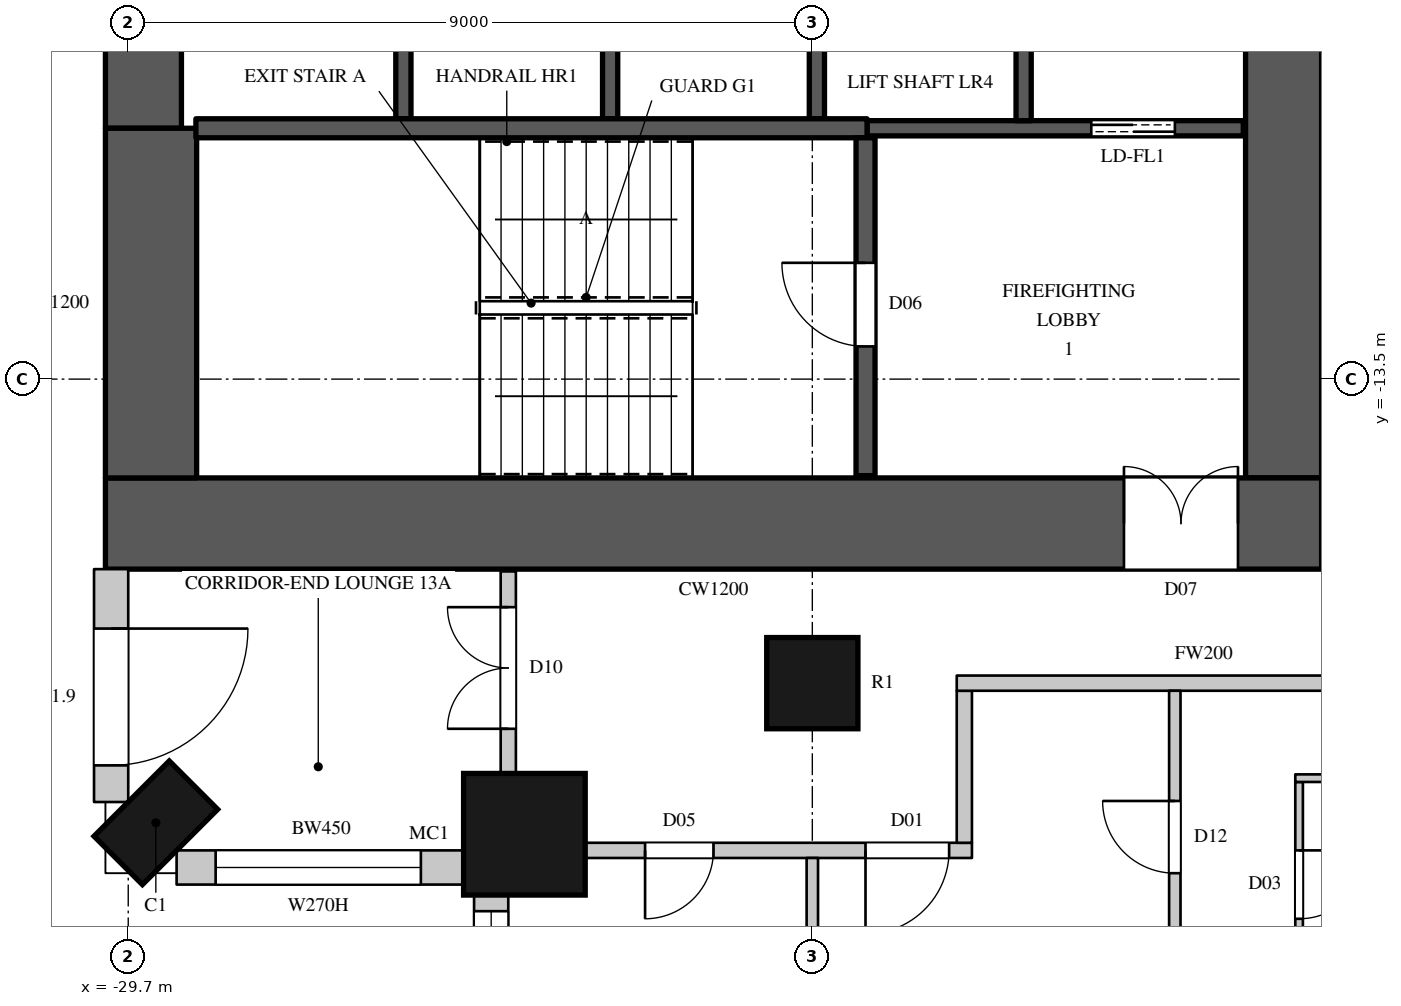
"""IFC4 building model, lengths in metres.
Left out: names, types, materials, properties, quantities, classifications, styles, units other than length and angle.
Written with IfcOpenShell. Run it as: python <this file> out.ifc"""

import sys

from ifc_helpers import new_model, si_unit, direction, frame, frame_2d, origin, origin_2d, place, context, subcontext, project, spatial, rectangle, circle, extrude, element, fill, save


model = new_model("IFC4")
c1 = context("Model", 3, precision=1e-05, world=origin(), true_north=direction((0.0, 1.0)))
c2 = subcontext(c1, "Body", "Model", "MODEL_VIEW")
j1 = project(units=[si_unit("LENGTHUNIT", "METRE"), si_unit("PLANEANGLEUNIT", "RADIAN")], contexts=[c1])
p1 = place(None, origin())
s1 = spatial("IfcSite", under=j1, at=p1, CompositionType="ELEMENT")
p2 = place(p1, origin())
s2 = spatial("IfcBuilding", under=s1, at=p2, CompositionType="ELEMENT")
p3 = place(p2, frame((0.0, 0.0, 77.1)))
s3 = spatial("IfcBuildingStorey", under=s2, at=p3, CompositionType="ELEMENT", Elevation=77.1)
p4 = place(p3, frame((-29.337, -19.337, 0.0), z_axis=(0.0, 0.0, 1.0), x_axis=(0.707106781187, -0.707106781187, 0.0)))
e1 = element("IfcColumn", 1, at=p4, inside=s3, PredefinedType="COLUMN", context=c2, shape_type="SweptSolid", body=[
    extrude(rectangle(XDim=0.9, YDim=1.4, at=origin_2d()), origin(), (0.0, 0.0, 1.0), 3.6),
])
p5 = place(p3, frame((-24.488, -19.488, 0.0), z_axis=(0.0, 0.0, 1.0), x_axis=(1.0, 0.0, 0.0)))
e2 = element("IfcColumn", 2, at=p5, inside=s3, PredefinedType="COLUMN", context=c2, shape_type="SweptSolid", body=[
    extrude(circle(Radius=0.8, at=origin_2d()), origin(), (0.0, 0.0, 1.0), 3.6),
])
p6 = place(p3, frame((-20.7, -17.5, 0.0), z_axis=(0.0, 0.0, 1.0), x_axis=(1.0, 0.0, 0.0)))
e3 = element("IfcColumn", 3, at=p6, inside=s3, PredefinedType="COLUMN", context=c2, shape_type="SweptSolid", body=[
    extrude(circle(Radius=0.6, at=origin_2d()), origin(), (0.0, 0.0, 1.0), 3.6),
])
p7 = place(p3, frame((-29.925, -16.0, 0.0), z_axis=(0.0, 0.0, 1.0), x_axis=(0.0, -1.0, 0.0)))
e4 = element("IfcWall", 4, at=p7, inside=s3, PredefinedType="SOLIDWALL", context=c2, shape_type="SweptSolid", body=[
    extrude(rectangle(XDim=3.064, YDim=0.45, at=frame_2d((1.532, 0.0))), origin(), (0.0, 0.0, 1.0), 3.3),
])
p8 = place(p7, frame((0.782, 0.0, 0.0)))
e5 = element("IfcOpeningElement", 5, at=p8, cuts=e4, PredefinedType="OPENING", context=c2, shape_type="SweptSolid", body=[
    extrude(rectangle(XDim=1.8, YDim=2.4, at=frame_2d((0.9, 1.2))), frame((0.0, 0.235, 0.0), z_axis=(0.0, -1.0, 0.0), x_axis=(1.0, 0.0, 0.0)), (0.0, 0.0, 1.0), 0.47),
])
p9 = place(p3, frame((-29.064, -19.925, 0.0), z_axis=(0.0, 0.0, 1.0), x_axis=(1.0, 0.0, 0.0)))
e6 = element("IfcWall", 6, at=p9, inside=s3, PredefinedType="SOLIDWALL", context=c2, shape_type="SweptSolid", body=[
    extrude(rectangle(XDim=3.805, YDim=0.45, at=frame_2d((1.903, 0.0))), origin(), (0.0, 0.0, 1.0), 3.3),
])
p10 = place(p9, frame((0.514, 0.0, 1.05)))
e7 = element("IfcOpeningElement", 7, at=p10, cuts=e6, PredefinedType="OPENING", context=c2, shape_type="SweptSolid", body=[
    extrude(rectangle(XDim=2.7, YDim=2.0, at=frame_2d((1.35, 1.0))), frame((0.0, 0.235, 0.0), z_axis=(0.0, -1.0, 0.0), x_axis=(1.0, 0.0, 0.0)), (0.0, 0.0, 1.0), 0.47),
])
p11 = place(p3, frame((-24.925, -20.259, 0.0), z_axis=(0.0, 0.0, 1.0), x_axis=(0.0, -1.0, 0.0)))
e8 = element("IfcWall", 8, at=p11, inside=s3, PredefinedType="SOLIDWALL", context=c2, shape_type="SweptSolid", body=[
    extrude(rectangle(XDim=1.792, YDim=0.45, at=frame_2d((0.896, 0.0))), origin(), (0.0, 0.0, 1.0), 3.3),
])
p12 = place(p11, frame((0.241, 0.0, 1.05)))
e9 = element("IfcOpeningElement", 9, at=p12, cuts=e8, PredefinedType="OPENING", context=c2, shape_type="SweptSolid", body=[
    extrude(rectangle(XDim=1.2, YDim=2.0, at=frame_2d((0.6, 1.0))), frame((0.0, 0.235, 0.0), z_axis=(0.0, -1.0, 0.0), x_axis=(1.0, 0.0, 0.0)), (0.0, 0.0, 1.0), 0.47),
])
p13 = place(p3, frame((-30.0, -15.4, 0.0), z_axis=(0.0, 0.0, 1.0), x_axis=(1.0, 0.0, 0.0)))
e10 = element("IfcWall", 10, at=p13, inside=s3, PredefinedType="SHEAR", context=c2, shape_type="SweptSolid", body=[
    extrude(rectangle(XDim=16.0, YDim=1.2, at=frame_2d((8.0, 0.0))), origin(), (0.0, 0.0, 1.0), 3.6),
])
p14 = place(p13, frame((13.4, 0.0, 0.0)))
e11 = element("IfcOpeningElement", 11, at=p14, cuts=e10, PredefinedType="OPENING", context=c2, shape_type="SweptSolid", body=[
    extrude(rectangle(XDim=1.5, YDim=2.4, at=frame_2d((0.75, 1.2))), frame((0.0, 0.61, 0.0), z_axis=(0.0, -1.0, 0.0), x_axis=(1.0, 0.0, 0.0)), (0.0, 0.0, 1.0), 1.22),
])
p15 = place(p3, frame((-14.5, -14.8, 0.0), z_axis=(0.0, 0.0, 1.0), x_axis=(0.0, 1.0, 0.0)))
e12 = element("IfcWall", 12, at=p15, inside=s3, PredefinedType="SHEAR", context=c2, shape_type="SweptSolid", body=[
    extrude(rectangle(XDim=29.6, YDim=1.0, at=frame_2d((14.8, 0.0))), origin(), (0.0, 0.0, 1.0), 3.6),
])
p16 = place(p15, frame((8.45, 0.0, 0.0)))
e13 = element("IfcOpeningElement", 13, at=p16, cuts=e12, PredefinedType="OPENING", context=c2, shape_type="SweptSolid", body=[
    extrude(rectangle(XDim=1.5, YDim=2.4, at=frame_2d((0.75, 1.2))), frame((0.0, 0.51, 0.0), z_axis=(0.0, -1.0, 0.0), x_axis=(1.0, 0.0, 0.0)), (0.0, 0.0, 1.0), 1.02),
])
p17 = place(p15, frame((19.65, 0.0, 0.0)))
e14 = element("IfcOpeningElement", 14, at=p17, cuts=e12, PredefinedType="OPENING", context=c2, shape_type="SweptSolid", body=[
    extrude(rectangle(XDim=1.5, YDim=2.4, at=frame_2d((0.75, 1.2))), frame((0.0, 0.51, 0.0), z_axis=(0.0, -1.0, 0.0), x_axis=(1.0, 0.0, 0.0)), (0.0, 0.0, 1.0), 1.02),
])
p18 = place(p15, frame((14.5, 0.0, 0.0)))
e15 = element("IfcOpeningElement", 15, at=p18, cuts=e12, PredefinedType="OPENING", context=c2, shape_type="SweptSolid", body=[
    extrude(rectangle(XDim=0.6, YDim=2.0, at=frame_2d((0.3, 1.0))), frame((0.0, 0.51, 0.0), z_axis=(0.0, -1.0, 0.0), x_axis=(1.0, 0.0, 0.0)), (0.0, 0.0, 1.0), 1.02),
])
p19 = place(p3, frame((-29.5, -10.2, 0.0), z_axis=(0.0, 0.0, 1.0), x_axis=(0.0, 1.0, 0.0)))
e16 = element("IfcWall", 16, at=p19, inside=s3, PredefinedType="SHEAR", context=c2, shape_type="SweptSolid", body=[
    extrude(rectangle(XDim=20.4, YDim=1.0, at=frame_2d((10.2, 0.0))), origin(), (0.0, 0.0, 1.0), 3.6),
])
p20 = place(p3, frame((-29.4, -14.8, 0.0), z_axis=(0.0, 0.0, 1.0), x_axis=(0.0, 1.0, 0.0)))
e17 = element("IfcWall", 17, at=p20, inside=s3, PredefinedType="SHEAR", context=c2, shape_type="SweptSolid", body=[
    extrude(rectangle(XDim=4.6, YDim=1.2, at=frame_2d((2.3, 0.0))), origin(), (0.0, 0.0, 1.0), 3.6),
])
p21 = place(p3, frame((-24.7, -18.7, 0.0), z_axis=(0.0, 0.0, 1.0), x_axis=(0.0, 1.0, 0.0)))
e18 = element("IfcWall", 18, at=p21, inside=s3, PredefinedType="PARTITIONING", context=c2, shape_type="SweptSolid", body=[
    extrude(rectangle(XDim=2.67, YDim=0.2, at=frame_2d((1.335, 0.0))), origin(), (0.0, 0.0, 1.0), 3.3),
])
p22 = place(p21, frame((0.6, 0.0, 0.0)))
e19 = element("IfcOpeningElement", 19, at=p22, cuts=e18, PredefinedType="OPENING", context=c2, shape_type="SweptSolid", body=[
    extrude(rectangle(XDim=1.6, YDim=2.4, at=frame_2d((0.8, 1.2))), frame((0.0, 0.11, 0.0), z_axis=(0.0, -1.0, 0.0), x_axis=(1.0, 0.0, 0.0)), (0.0, 0.0, 1.0), 0.22),
])
p23 = place(p3, frame((-23.7, -19.7, 0.0), z_axis=(0.0, 0.0, 1.0), x_axis=(1.0, 0.0, 0.0)))
e20 = element("IfcWall", 20, at=p23, inside=s3, PredefinedType="PARTITIONING", context=c2, shape_type="SweptSolid", body=[
    extrude(rectangle(XDim=5.1, YDim=0.2, at=frame_2d((2.55, 0.0))), origin(), (0.0, 0.0, 1.0), 3.3),
])
p24 = place(p23, frame((0.8, 0.0, 0.0)))
e21 = element("IfcOpeningElement", 21, at=p24, cuts=e20, PredefinedType="OPENING", context=c2, shape_type="SweptSolid", body=[
    extrude(rectangle(XDim=0.9, YDim=2.2, at=frame_2d((0.45, 1.1))), frame((0.0, 0.11, 0.0), z_axis=(0.0, -1.0, 0.0), x_axis=(1.0, 0.0, 0.0)), (0.0, 0.0, 1.0), 0.22),
])
p25 = place(p23, frame((3.7, 0.0, 0.0)))
e22 = element("IfcOpeningElement", 22, at=p25, cuts=e20, PredefinedType="OPENING", context=c2, shape_type="SweptSolid", body=[
    extrude(rectangle(XDim=1.1, YDim=2.4, at=frame_2d((0.55, 1.2))), frame((0.0, 0.11, 0.0), z_axis=(0.0, -1.0, 0.0), x_axis=(1.0, 0.0, 0.0)), (0.0, 0.0, 1.0), 0.22),
])
p26 = place(p3, frame((-18.7, -19.6, 0.0), z_axis=(0.0, 0.0, 1.0), x_axis=(0.0, 1.0, 0.0)))
e23 = element("IfcWall", 23, at=p26, inside=s3, PredefinedType="PARTITIONING", context=c2, shape_type="SweptSolid", body=[
    extrude(rectangle(XDim=2.0, YDim=0.2, at=frame_2d((1.0, 0.0))), origin(), (0.0, 0.0, 1.0), 3.3),
])
p27 = place(p3, frame((-18.8, -17.5, 0.0), z_axis=(0.0, 0.0, 1.0), x_axis=(1.0, 0.0, 0.0)))
e24 = element("IfcWall", 24, at=p27, inside=s3, PredefinedType="PARTITIONING", context=c2, shape_type="SweptSolid", body=[
    extrude(rectangle(XDim=6.5, YDim=0.2, at=frame_2d((3.25, 0.0))), origin(), (0.0, 0.0, 1.0), 2.75),
])
p28 = place(p3, frame((-20.7, -24.75, 0.0), z_axis=(0.0, 0.0, 1.0), x_axis=(0.0, 1.0, 0.0)))
e25 = element("IfcWall", 25, at=p28, inside=s3, PredefinedType="PARTITIONING", context=c2, shape_type="SweptSolid", body=[
    extrude(rectangle(XDim=4.95, YDim=0.15, at=frame_2d((2.475, 0.0))), origin(), (0.0, 0.0, 1.0), 2.75),
])
p29 = place(p3, frame((-15.931, -25.7, 0.0), z_axis=(0.0, 0.0, 1.0), x_axis=(0.0, 1.0, 0.0)))
e26 = element("IfcWall", 26, at=p29, inside=s3, PredefinedType="PARTITIONING", context=c2, shape_type="SweptSolid", body=[
    extrude(rectangle(XDim=8.1, YDim=0.15, at=frame_2d((4.05, 0.0))), origin(), (0.0, 0.0, 1.0), 3.3),
])
p30 = place(p29, frame((5.7, 0.0, 0.0)))
e27 = element("IfcOpeningElement", 27, at=p30, cuts=e26, PredefinedType="OPENING", context=c2, shape_type="SweptSolid", body=[
    extrude(rectangle(XDim=0.95, YDim=2.2, at=frame_2d((0.475, 1.1))), frame((0.0, 0.085, 0.0), z_axis=(0.0, -1.0, 0.0), x_axis=(1.0, 0.0, 0.0)), (0.0, 0.0, 1.0), 0.17),
])
for number, where, z_axis, x_axis in (
    (28, (-26.08, -10.075, 0.0), (0.0, 0.0, 1.0), (0.0, 1.0, 0.0)),
    (29, (-23.36, -10.075, 0.0), (0.0, 0.0, 1.0), (0.0, 1.0, 0.0)),
    (30, (-20.64, -10.075, 0.0), (0.0, 0.0, 1.0), (0.0, 1.0, 0.0)),
):
    element("IfcWall", number, at=place(p3, frame(where, z_axis=z_axis, x_axis=x_axis)), inside=s3, PredefinedType="SHEAR", context=c2, shape_type="SweptSolid", body=[
        extrude(rectangle(XDim=2.575, YDim=0.2, at=frame_2d((1.288, 0.0))), origin(), (0.0, 0.0, 1.0), 3.6),
    ])
p31 = place(p3, frame((-19.98, -10.2, 0.0), z_axis=(0.0, 0.0, 1.0), x_axis=(1.0, 0.0, 0.0)))
e31 = element("IfcWall", 31, at=p31, inside=s3, PredefinedType="SHEAR", context=c2, shape_type="SweptSolid", body=[
    extrude(rectangle(XDim=4.95, YDim=0.2, at=frame_2d((2.475, 0.0))), origin(), (0.0, 0.0, 1.0), 3.3),
])
p32 = place(p31, frame((2.95, 0.0, 0.0)))
e32 = element("IfcOpeningElement", 32, at=p32, cuts=e31, PredefinedType="OPENING", context=c2, shape_type="SweptSolid", body=[
    extrude(rectangle(XDim=1.1, YDim=2.2, at=frame_2d((0.55, 1.1))), frame((0.0, 0.11, 0.0), z_axis=(0.0, -1.0, 0.0), x_axis=(1.0, 0.0, 0.0)), (0.0, 0.0, 1.0), 0.22),
])
p33 = place(p3, frame((-17.92, -10.1, 0.0), z_axis=(0.0, 0.0, 1.0), x_axis=(0.0, 1.0, 0.0)))
e33 = element("IfcWall", 33, at=p33, inside=s3, PredefinedType="SHEAR", context=c2, shape_type="SweptSolid", body=[
    extrude(rectangle(XDim=2.6, YDim=0.2, at=frame_2d((1.3, 0.0))), origin(), (0.0, 0.0, 1.0), 3.6),
])
p34 = place(p3, frame((-28.81, -10.2, 0.0), z_axis=(0.0, 0.0, 1.0), x_axis=(1.0, 0.0, 0.0)))
e34 = element("IfcWall", 34, at=p34, inside=s3, PredefinedType="SHEAR", context=c2, shape_type="SweptSolid", body=[
    extrude(rectangle(XDim=8.83, YDim=0.25, at=frame_2d((4.415, 0.0))), origin(), (0.0, 0.0, 1.0), 3.3),
])
p35 = place(p3, frame((-20.0, -14.77, 0.0), z_axis=(0.0, 0.0, 1.0), x_axis=(0.0, 1.0, 0.0)))
e35 = element("IfcWall", 35, at=p35, inside=s3, PredefinedType="SHEAR", context=c2, shape_type="SweptSolid", body=[
    extrude(rectangle(XDim=4.445, YDim=0.25, at=frame_2d((2.223, 0.0))), origin(), (0.0, 0.0, 1.0), 3.3),
])
p36 = place(p35, frame((1.7, 0.0, 0.0)))
e36 = element("IfcOpeningElement", 36, at=p36, cuts=e35, PredefinedType="OPENING", context=c2, shape_type="SweptSolid", body=[
    extrude(rectangle(XDim=1.1, YDim=2.2, at=frame_2d((0.55, 1.1))), frame((0.0, 0.135, 0.0), z_axis=(0.0, -1.0, 0.0), x_axis=(1.0, 0.0, 0.0)), (0.0, 0.0, 1.0), 0.27),
])
p37 = place(p3, frame((-14.296, -21.5, 0.0), z_axis=(0.0, 0.0, 1.0), x_axis=(0.0, 1.0, 0.0)))
e37 = element("IfcWall", 37, at=p37, inside=s3, PredefinedType="PARTITIONING", context=c2, shape_type="SweptSolid", body=[
    extrude(rectangle(XDim=2.7, YDim=0.1, at=frame_2d((1.35, 0.0))), origin(), (0.0, 0.0, 1.0), 3.3),
])
p38 = place(p37, frame((0.9, 0.0, 0.0)))
e38 = element("IfcOpeningElement", 38, at=p38, cuts=e37, PredefinedType="OPENING", context=c2, shape_type="SweptSolid", body=[
    extrude(rectangle(XDim=0.9, YDim=2.2, at=frame_2d((0.45, 1.1))), frame((0.0, 0.06, 0.0), z_axis=(0.0, -1.0, 0.0), x_axis=(1.0, 0.0, 0.0)), (0.0, 0.0, 1.0), 0.12),
])
p39 = place(p3, frame((-14.346, -18.75, 0.0), z_axis=(0.0, 0.0, 1.0), x_axis=(1.0, 0.0, 0.0)))
e39 = element("IfcWall", 39, at=p39, inside=s3, PredefinedType="PARTITIONING", context=c2, shape_type="SweptSolid", body=[
    extrude(rectangle(XDim=5.092, YDim=0.1, at=frame_2d((2.546, 0.0))), origin(), (0.0, 0.0, 1.0), 3.3),
])
p40 = place(p39, frame((3.95, 0.0, 0.0)))
e40 = element("IfcOpeningElement", 40, at=p40, cuts=e39, PredefinedType="OPENING", context=c2, shape_type="SweptSolid", body=[
    extrude(rectangle(XDim=0.9, YDim=2.2, at=frame_2d((0.45, 1.1))), frame((0.0, 0.06, 0.0), z_axis=(0.0, -1.0, 0.0), x_axis=(1.0, 0.0, 0.0)), (0.0, 0.0, 1.0), 0.12),
])
p41 = place(p8, origin())
e41 = element("IfcDoor", 41, at=p41, inside=s3, OperationType="SLIDING_TO_LEFT", PredefinedType="DOOR", context=c2, shape_type="SweptSolid", body=[
    extrude(rectangle(XDim=1.8, YDim=2.4, at=frame_2d((0.9, 1.2))), frame((0.0, 0.13, 0.0), z_axis=(0.0, -1.0, 0.0), x_axis=(1.0, 0.0, 0.0)), (0.0, 0.0, 1.0), 0.05),
])
fill(e5, e41)
p42 = place(p10, origin())
e42 = element("IfcWindow", 42, at=p42, inside=s3, PartitioningType="SINGLE_PANEL", PredefinedType="WINDOW", context=c2, shape_type="SweptSolid", body=[
    extrude(rectangle(XDim=2.7, YDim=2.0, at=frame_2d((1.35, 1.0))), frame((0.0, 0.135, 0.0), z_axis=(0.0, -1.0, 0.0), x_axis=(1.0, 0.0, 0.0)), (0.0, 0.0, 1.0), 0.06),
])
fill(e7, e42)
p43 = place(p12, origin())
e43 = element("IfcWindow", 43, at=p43, inside=s3, PartitioningType="SINGLE_PANEL", PredefinedType="WINDOW", context=c2, shape_type="SweptSolid", body=[
    extrude(rectangle(XDim=1.2, YDim=2.0, at=frame_2d((0.6, 1.0))), frame((0.0, 0.135, 0.0), z_axis=(0.0, -1.0, 0.0), x_axis=(1.0, 0.0, 0.0)), (0.0, 0.0, 1.0), 0.06),
])
fill(e9, e43)
p44 = place(p36, origin())
e44 = element("IfcDoor", 44, at=p44, inside=s3, OperationType="SINGLE_SWING_RIGHT", PredefinedType="DOOR", context=c2, shape_type="SweptSolid", body=[
    extrude(rectangle(XDim=1.1, YDim=2.2, at=frame_2d((0.55, 1.1))), frame((0.0, 0.025, 0.0), z_axis=(0.0, -1.0, 0.0), x_axis=(1.0, 0.0, 0.0)), (0.0, 0.0, 1.0), 0.05),
])
fill(e36, e44)
p45 = place(p32, origin())
e45 = element("IfcDoor", 45, at=p45, inside=s3, OperationType="DOUBLE_DOOR_SLIDING", PredefinedType="DOOR", context=c2, shape_type="SweptSolid", body=[
    extrude(rectangle(XDim=1.1, YDim=2.2, at=frame_2d((0.55, 1.1))), frame((0.0, 0.025, 0.0), z_axis=(0.0, -1.0, 0.0), x_axis=(1.0, 0.0, 0.0)), (0.0, 0.0, 1.0), 0.05),
])
fill(e32, e45)
p46 = place(p24, origin())
e46 = element("IfcDoor", 46, at=p46, inside=s3, OperationType="SINGLE_SWING_RIGHT", PredefinedType="DOOR", context=c2, shape_type="SweptSolid", body=[
    extrude(rectangle(XDim=0.9, YDim=2.2, at=frame_2d((0.45, 1.1))), frame((0.0, 0.025, 0.0), z_axis=(0.0, -1.0, 0.0), x_axis=(1.0, 0.0, 0.0)), (0.0, 0.0, 1.0), 0.05),
])
fill(e21, e46)
p47 = place(p22, origin())
e47 = element("IfcDoor", 47, at=p47, inside=s3, OperationType="DOUBLE_DOOR_SINGLE_SWING", PredefinedType="DOOR", context=c2, shape_type="SweptSolid", body=[
    extrude(rectangle(XDim=1.6, YDim=2.4, at=frame_2d((0.8, 1.2))), frame((0.0, 0.025, 0.0), z_axis=(0.0, -1.0, 0.0), x_axis=(1.0, 0.0, 0.0)), (0.0, 0.0, 1.0), 0.05),
])
fill(e19, e47)
p48 = place(p25, origin())
e48 = element("IfcDoor", 48, at=p48, inside=s3, OperationType="SINGLE_SWING_RIGHT", PredefinedType="DOOR", context=c2, shape_type="SweptSolid", body=[
    extrude(rectangle(XDim=1.1, YDim=2.4, at=frame_2d((0.55, 1.2))), frame((0.0, 0.025, 0.0), z_axis=(0.0, -1.0, 0.0), x_axis=(1.0, 0.0, 0.0)), (0.0, 0.0, 1.0), 0.05),
])
fill(e22, e48)
p49 = place(p30, origin())
e49 = element("IfcDoor", 49, at=p49, inside=s3, OperationType="SINGLE_SWING_RIGHT", PredefinedType="DOOR", context=c2, shape_type="SweptSolid", body=[
    extrude(rectangle(XDim=0.95, YDim=2.2, at=frame_2d((0.475, 1.1))), frame((0.0, 0.025, 0.0), z_axis=(0.0, -1.0, 0.0), x_axis=(1.0, 0.0, 0.0)), (0.0, 0.0, 1.0), 0.05),
])
fill(e27, e49)
p50 = place(p38, origin())
e50 = element("IfcDoor", 50, at=p50, inside=s3, OperationType="SINGLE_SWING_LEFT", PredefinedType="DOOR", context=c2, shape_type="SweptSolid", body=[
    extrude(rectangle(XDim=0.9, YDim=2.2, at=frame_2d((0.45, 1.1))), frame((0.0, 0.025, 0.0), z_axis=(0.0, -1.0, 0.0), x_axis=(1.0, 0.0, 0.0)), (0.0, 0.0, 1.0), 0.05),
])
fill(e38, e50)
p51 = place(p14, origin())
e51 = element("IfcDoor", 51, at=p51, inside=s3, OperationType="DOUBLE_DOOR_SINGLE_SWING", PredefinedType="DOOR", context=c2, shape_type="SweptSolid", body=[
    extrude(rectangle(XDim=1.5, YDim=2.4, at=frame_2d((0.75, 1.2))), frame((0.0, 0.025, 0.0), z_axis=(0.0, -1.0, 0.0), x_axis=(1.0, 0.0, 0.0)), (0.0, 0.0, 1.0), 0.05),
])
fill(e11, e51)
save(model, sys.argv[1])
